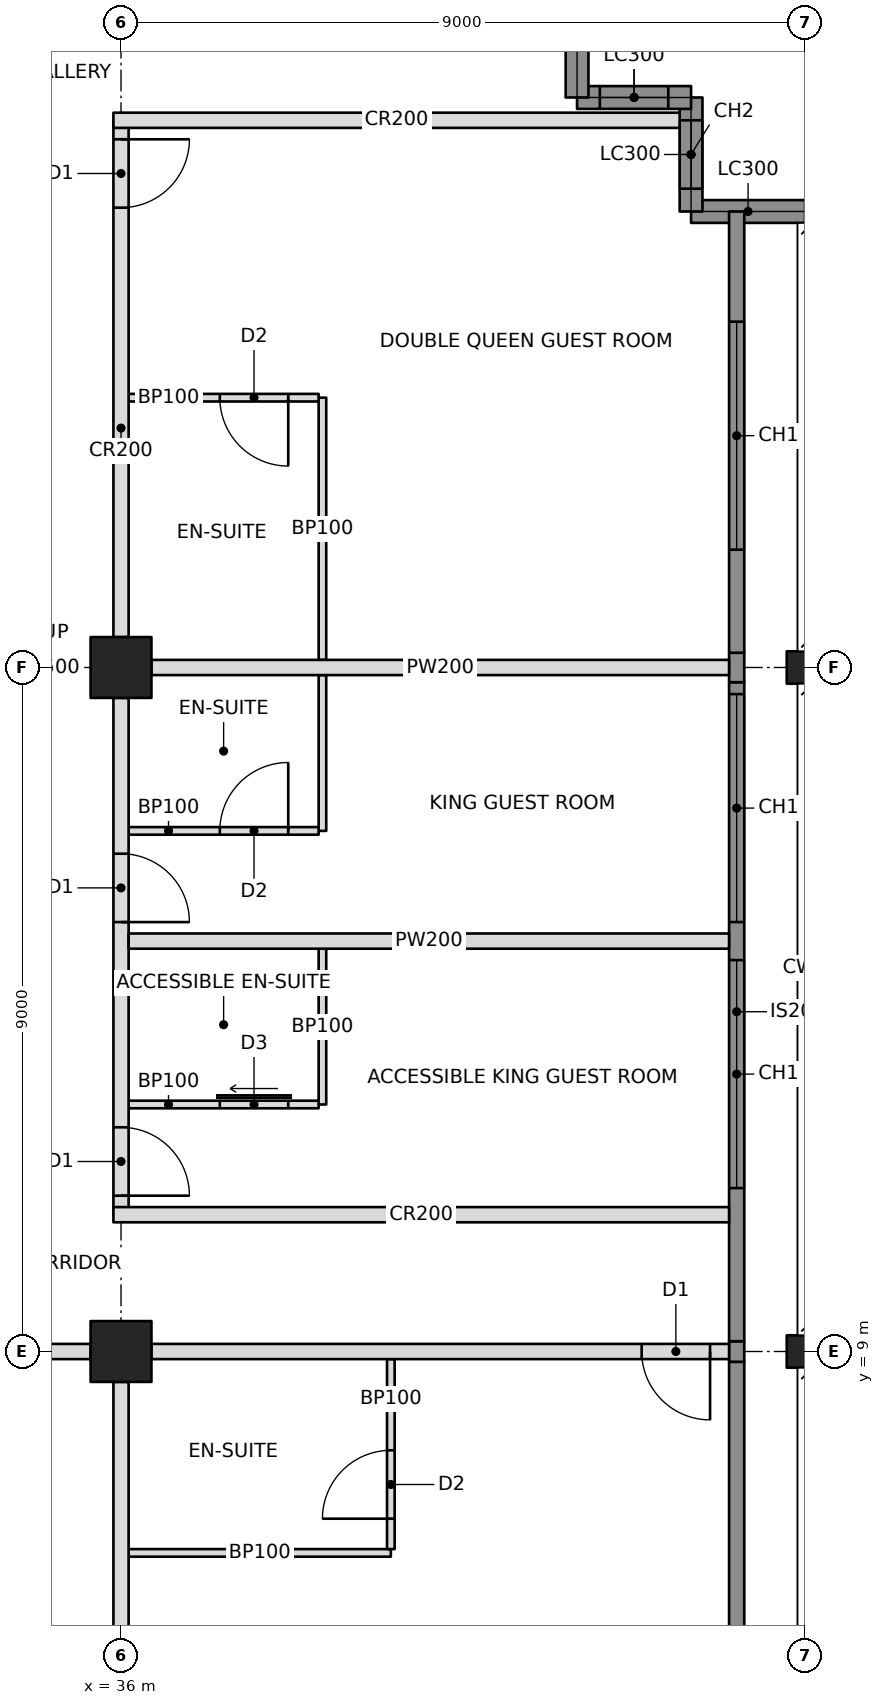
"""IFC4 building model, lengths in metres.
Left out: names, types, materials, properties, quantities, classifications, styles, units other than length and angle.
Written with IfcOpenShell. Run it as: python <this file> out.ifc"""

import sys

from ifc_helpers import new_model, si_unit, direction, frame, frame_2d, origin, origin_2d, place, context, subcontext, project, spatial, rectangle, hollow_rectangle, i_section, extrude, element, fill, save


model = new_model("IFC4")
c1 = context("Model", 3, precision=1e-05, world=origin(), true_north=direction((0.0, 1.0)))
c2 = subcontext(c1, "Body", "Model", "MODEL_VIEW")
j1 = project(units=[si_unit("LENGTHUNIT", "METRE"), si_unit("PLANEANGLEUNIT", "RADIAN")], contexts=[c1])
p1 = place(None, origin())
s1 = spatial("IfcSite", under=j1, at=p1, CompositionType="ELEMENT")
p2 = place(p1, origin())
s2 = spatial("IfcBuilding", under=s1, at=p2, CompositionType="ELEMENT")
p3 = place(p2, frame((0.0, 0.0, 197.8)))
s3 = spatial("IfcBuildingStorey", under=s2, at=p3, CompositionType="ELEMENT", Elevation=197.8)
for number, where, z_axis, x_axis in (
    (1, (36.0, 9.0, 0.0), (0.0, 0.0, 1.0), (0.0, 1.0, 0.0)),
    (2, (36.0, 18.0, 0.0), (0.0, 0.0, 1.0), (0.0, 1.0, 0.0)),
):
    element("IfcColumn", number, at=place(p3, frame(where, z_axis=z_axis, x_axis=x_axis)), inside=s3, PredefinedType="COLUMN", context=c2, shape_type="SweptSolid", body=[
        extrude(hollow_rectangle(XDim=0.8, YDim=0.8, WallThickness=0.05, at=origin_2d()), origin(), (0.0, 0.0, 1.0), 3.4),
    ])
for number, where, z_axis, x_axis in (
    (3, (45.0, 9.0, 0.0), (0.0, 0.0, 1.0), (0.0, 1.0, 0.0)),
    (4, (45.0, 18.0, 0.0), (0.0, 0.0, 1.0), (0.0, 1.0, 0.0)),
):
    element("IfcColumn", number, at=place(p3, frame(where, z_axis=z_axis, x_axis=x_axis)), inside=s3, PredefinedType="COLUMN", context=c2, shape_type="SweptSolid", body=[
        extrude(i_section(OverallWidth=0.427, OverallDepth=0.483, WebThickness=0.051, FlangeThickness=0.082, at=origin_2d()), origin(), (0.0, 0.0, 1.0), 3.4),
    ])
p4 = place(p3, frame((45.0, 24.0, 0.0), z_axis=(0.0, 0.0, 1.0), x_axis=(-1.0, 0.0, 0.0)))
e5 = element("IfcWall", 5, at=p4, inside=s3, PredefinedType="SOLIDWALL", context=c2, shape_type="SweptSolid", body=[
    extrude(rectangle(XDim=1.5, YDim=0.3, at=frame_2d((0.75, 0.0))), origin(), (0.0, 0.0, 1.0), 2.42),
])
p5 = place(p3, frame((43.5, 24.0, 0.0), z_axis=(0.0, 0.0, 1.0), x_axis=(0.0, 1.0, 0.0)))
e6 = element("IfcWall", 6, at=p5, inside=s3, PredefinedType="SOLIDWALL", context=c2, shape_type="SweptSolid", body=[
    extrude(rectangle(XDim=1.5, YDim=0.3, at=frame_2d((0.75, 0.0))), origin(), (0.0, 0.0, 1.0), 3.2),
])
p6 = place(p5, frame((0.3, 0.0, 0.6)))
e7 = element("IfcOpeningElement", 7, at=p6, cuts=e6, PredefinedType="OPENING", context=c2, shape_type="SweptSolid", body=[
    extrude(rectangle(XDim=0.9, YDim=2.2, at=frame_2d((0.45, 1.1))), frame((0.0, 0.16, 0.0), z_axis=(0.0, -1.0, 0.0), x_axis=(1.0, 0.0, 0.0)), (0.0, 0.0, 1.0), 0.32),
])
p7 = place(p3, frame((43.5, 25.5, 0.0), z_axis=(0.0, 0.0, 1.0), x_axis=(-1.0, 0.0, 0.0)))
e8 = element("IfcWall", 8, at=p7, inside=s3, PredefinedType="SOLIDWALL", context=c2, shape_type="SweptSolid", body=[
    extrude(rectangle(XDim=1.5, YDim=0.3, at=frame_2d((0.75, 0.0))), origin(), (0.0, 0.0, 1.0), 3.2),
])
p8 = place(p7, frame((0.3, 0.0, 0.6)))
e9 = element("IfcOpeningElement", 9, at=p8, cuts=e8, PredefinedType="OPENING", context=c2, shape_type="SweptSolid", body=[
    extrude(rectangle(XDim=0.9, YDim=2.2, at=frame_2d((0.45, 1.1))), frame((0.0, 0.16, 0.0), z_axis=(0.0, -1.0, 0.0), x_axis=(1.0, 0.0, 0.0)), (0.0, 0.0, 1.0), 0.32),
])
p9 = place(p3, frame((42.0, 25.5, 0.0), z_axis=(0.0, 0.0, 1.0), x_axis=(0.0, 1.0, 0.0)))
e10 = element("IfcWall", 10, at=p9, inside=s3, PredefinedType="SOLIDWALL", context=c2, shape_type="SweptSolid", body=[
    extrude(rectangle(XDim=1.5, YDim=0.3, at=frame_2d((0.75, 0.0))), origin(), (0.0, 0.0, 1.0), 2.42),
])
p10 = place(p3, frame((27.4, 9.0, 0.0), z_axis=(0.0, 0.0, 1.0), x_axis=(1.0, 0.0, 0.0)))
e11 = element("IfcWall", 11, at=p10, inside=s3, PredefinedType="PARTITIONING", context=c2, shape_type="SweptSolid", body=[
    extrude(rectangle(XDim=8.2, YDim=0.2, at=frame_2d((4.1, 0.0))), origin(), (0.0, 0.0, 1.0), 2.405),
])
p11 = place(p10, frame((0.15, 0.0, 0.0)))
e12 = element("IfcOpeningElement", 12, at=p11, cuts=e11, PredefinedType="OPENING", context=c2, shape_type="SweptSolid", body=[
    extrude(rectangle(XDim=0.9, YDim=2.1, at=frame_2d((0.45, 1.05))), frame((0.0, 0.11, 0.0), z_axis=(0.0, -1.0, 0.0), x_axis=(1.0, 0.0, 0.0)), (0.0, 0.0, 1.0), 0.22),
])
p12 = place(p3, frame((36.4, 9.0, 0.0), z_axis=(0.0, 0.0, 1.0), x_axis=(1.0, 0.0, 0.0)))
e13 = element("IfcWall", 13, at=p12, inside=s3, PredefinedType="PARTITIONING", context=c2, shape_type="SweptSolid", body=[
    extrude(rectangle(XDim=7.6, YDim=0.2, at=frame_2d((3.8, 0.0))), origin(), (0.0, 0.0, 1.0), 2.438),
])
p13 = place(p12, frame((6.45, 0.0, 0.0)))
e14 = element("IfcOpeningElement", 14, at=p13, cuts=e13, PredefinedType="OPENING", context=c2, shape_type="SweptSolid", body=[
    extrude(rectangle(XDim=0.9, YDim=2.1, at=frame_2d((0.45, 1.05))), frame((0.0, 0.11, 0.0), z_axis=(0.0, -1.0, 0.0), x_axis=(1.0, 0.0, 0.0)), (0.0, 0.0, 1.0), 0.22),
])
p14 = place(p3, frame((36.0, 10.8, 0.0), z_axis=(0.0, 0.0, 1.0), x_axis=(0.0, 1.0, 0.0)))
e15 = element("IfcWall", 15, at=p14, inside=s3, PredefinedType="PARTITIONING", context=c2, shape_type="SweptSolid", body=[
    extrude(rectangle(XDim=6.8, YDim=0.2, at=frame_2d((3.4, 0.0))), origin(), (0.0, 0.0, 1.0), 2.405),
])
p15 = place(p14, frame((0.25, 0.0, 0.0)))
e16 = element("IfcOpeningElement", 16, at=p15, cuts=e15, PredefinedType="OPENING", context=c2, shape_type="SweptSolid", body=[
    extrude(rectangle(XDim=0.9, YDim=2.1, at=frame_2d((0.45, 1.05))), frame((0.0, 0.11, 0.0), z_axis=(0.0, -1.0, 0.0), x_axis=(1.0, 0.0, 0.0)), (0.0, 0.0, 1.0), 0.22),
])
p16 = place(p14, frame((3.85, 0.0, 0.0)))
e17 = element("IfcOpeningElement", 17, at=p16, cuts=e15, PredefinedType="OPENING", context=c2, shape_type="SweptSolid", body=[
    extrude(rectangle(XDim=0.9, YDim=2.1, at=frame_2d((0.45, 1.05))), frame((0.0, 0.11, 0.0), z_axis=(0.0, -1.0, 0.0), x_axis=(1.0, 0.0, 0.0)), (0.0, 0.0, 1.0), 0.22),
])
p17 = place(p3, frame((36.0, 18.4, 0.0), z_axis=(0.0, 0.0, 1.0), x_axis=(0.0, 1.0, 0.0)))
e18 = element("IfcWall", 18, at=p17, inside=s3, PredefinedType="PARTITIONING", context=c2, shape_type="SweptSolid", body=[
    extrude(rectangle(XDim=6.8, YDim=0.2, at=frame_2d((3.4, 0.0))), origin(), (0.0, 0.0, 1.0), 2.405),
])
p18 = place(p17, frame((5.65, 0.0, 0.0)))
e19 = element("IfcOpeningElement", 19, at=p18, cuts=e18, PredefinedType="OPENING", context=c2, shape_type="SweptSolid", body=[
    extrude(rectangle(XDim=0.9, YDim=2.1, at=frame_2d((0.45, 1.05))), frame((0.0, 0.11, 0.0), z_axis=(0.0, -1.0, 0.0), x_axis=(1.0, 0.0, 0.0)), (0.0, 0.0, 1.0), 0.22),
])
p19 = place(p3, frame((35.9, 10.8, 0.0), z_axis=(0.0, 0.0, 1.0), x_axis=(1.0, 0.0, 0.0)))
e20 = element("IfcWall", 20, at=p19, inside=s3, PredefinedType="PARTITIONING", context=c2, shape_type="SweptSolid", body=[
    extrude(rectangle(XDim=8.1, YDim=0.2, at=frame_2d((4.05, 0.0))), origin(), (0.0, 0.0, 1.0), 2.404),
])
p20 = place(p3, frame((35.9, 25.2, 0.0), z_axis=(0.0, 0.0, 1.0), x_axis=(1.0, 0.0, 0.0)))
e21 = element("IfcWall", 21, at=p20, inside=s3, PredefinedType="PARTITIONING", context=c2, shape_type="SweptSolid", body=[
    extrude(rectangle(XDim=7.45, YDim=0.2, at=frame_2d((3.725, 0.0))), origin(), (0.0, 0.0, 1.0), 2.404),
])
p21 = place(p3, frame((36.0, 8.6, 0.0), z_axis=(0.0, 0.0, 1.0), x_axis=(0.0, -1.0, 0.0)))
e22 = element("IfcWall", 22, at=p21, inside=s3, PredefinedType="PARTITIONING", context=c2, shape_type="SweptSolid", body=[
    extrude(rectangle(XDim=7.6, YDim=0.2, at=frame_2d((3.8, 0.0))), origin(), (0.0, 0.0, 1.0), 2.438),
])
p22 = place(p3, frame((36.1, 6.35, 0.0), z_axis=(0.0, 0.0, 1.0), x_axis=(1.0, 0.0, 0.0)))
e23 = element("IfcWall", 23, at=p22, inside=s3, PredefinedType="PARTITIONING", context=c2, shape_type="SweptSolid", body=[
    extrude(rectangle(XDim=3.45, YDim=0.1, at=frame_2d((1.725, 0.0))), origin(), (0.0, 0.0, 1.0), 2.438),
])
p23 = place(p3, frame((39.55, 8.9, 0.0), z_axis=(0.0, 0.0, 1.0), x_axis=(0.0, -1.0, 0.0)))
e24 = element("IfcWall", 24, at=p23, inside=s3, PredefinedType="PARTITIONING", context=c2, shape_type="SweptSolid", body=[
    extrude(rectangle(XDim=2.5, YDim=0.1, at=frame_2d((1.25, 0.0))), origin(), (0.0, 0.0, 1.0), 2.438),
])
p24 = place(p23, frame((1.2, 0.0, 0.0)))
e25 = element("IfcOpeningElement", 25, at=p24, cuts=e24, PredefinedType="OPENING", context=c2, shape_type="SweptSolid", body=[
    extrude(rectangle(XDim=0.9, YDim=2.1, at=frame_2d((0.45, 1.05))), frame((0.0, 0.06, 0.0), z_axis=(0.0, -1.0, 0.0), x_axis=(1.0, 0.0, 0.0)), (0.0, 0.0, 1.0), 0.12),
])
p25 = place(p3, frame((36.1, 14.4, 0.0), z_axis=(0.0, 0.0, 1.0), x_axis=(1.0, 0.0, 0.0)))
e26 = element("IfcWall", 26, at=p25, inside=s3, PredefinedType="PARTITIONING", context=c2, shape_type="SweptSolid", body=[
    extrude(rectangle(XDim=7.9, YDim=0.2, at=frame_2d((3.95, 0.0))), origin(), (0.0, 0.0, 1.0), 2.404),
])
p26 = place(p3, frame((36.4, 18.0, 0.0), z_axis=(0.0, 0.0, 1.0), x_axis=(1.0, 0.0, 0.0)))
e27 = element("IfcWall", 27, at=p26, inside=s3, PredefinedType="PARTITIONING", context=c2, shape_type="SweptSolid", body=[
    extrude(rectangle(XDim=7.6, YDim=0.2, at=frame_2d((3.8, 0.0))), origin(), (0.0, 0.0, 1.0), 2.405),
])
p27 = place(p3, frame((38.65, 12.25, 0.0), z_axis=(0.0, 0.0, 1.0), x_axis=(0.0, 1.0, 0.0)))
e28 = element("IfcWall", 28, at=p27, inside=s3, PredefinedType="PARTITIONING", context=c2, shape_type="SweptSolid", body=[
    extrude(rectangle(XDim=2.05, YDim=0.1, at=frame_2d((1.025, 0.0))), origin(), (0.0, 0.0, 1.0), 3.2),
])
p28 = place(p3, frame((36.1, 12.25, 0.0), z_axis=(0.0, 0.0, 1.0), x_axis=(1.0, 0.0, 0.0)))
e29 = element("IfcWall", 29, at=p28, inside=s3, PredefinedType="PARTITIONING", context=c2, shape_type="SweptSolid", body=[
    extrude(rectangle(XDim=2.5, YDim=0.1, at=frame_2d((1.25, 0.0))), origin(), (0.0, 0.0, 1.0), 2.404),
])
p29 = place(p28, frame((1.2, 0.0, 0.0)))
e30 = element("IfcOpeningElement", 30, at=p29, cuts=e29, PredefinedType="OPENING", context=c2, shape_type="SweptSolid", body=[
    extrude(rectangle(XDim=0.9, YDim=2.1, at=frame_2d((0.45, 1.05))), frame((0.0, 0.06, 0.0), z_axis=(0.0, -1.0, 0.0), x_axis=(1.0, 0.0, 0.0)), (0.0, 0.0, 1.0), 0.12),
])
p30 = place(p3, frame((38.65, 15.85, 0.0), z_axis=(0.0, 0.0, 1.0), x_axis=(0.0, 1.0, 0.0)))
e31 = element("IfcWall", 31, at=p30, inside=s3, PredefinedType="PARTITIONING", context=c2, shape_type="SweptSolid", body=[
    extrude(rectangle(XDim=2.05, YDim=0.1, at=frame_2d((1.025, 0.0))), origin(), (0.0, 0.0, 1.0), 2.404),
])
p31 = place(p3, frame((36.1, 15.85, 0.0), z_axis=(0.0, 0.0, 1.0), x_axis=(1.0, 0.0, 0.0)))
e32 = element("IfcWall", 32, at=p31, inside=s3, PredefinedType="PARTITIONING", context=c2, shape_type="SweptSolid", body=[
    extrude(rectangle(XDim=2.5, YDim=0.1, at=frame_2d((1.25, 0.0))), origin(), (0.0, 0.0, 1.0), 2.404),
])
p32 = place(p31, frame((1.2, 0.0, 0.0)))
e33 = element("IfcOpeningElement", 33, at=p32, cuts=e32, PredefinedType="OPENING", context=c2, shape_type="SweptSolid", body=[
    extrude(rectangle(XDim=0.9, YDim=2.1, at=frame_2d((0.45, 1.05))), frame((0.0, 0.06, 0.0), z_axis=(0.0, -1.0, 0.0), x_axis=(1.0, 0.0, 0.0)), (0.0, 0.0, 1.0), 0.12),
])
p33 = place(p3, frame((38.65, 18.1, 0.0), z_axis=(0.0, 0.0, 1.0), x_axis=(0.0, 1.0, 0.0)))
e34 = element("IfcWall", 34, at=p33, inside=s3, PredefinedType="PARTITIONING", context=c2, shape_type="SweptSolid", body=[
    extrude(rectangle(XDim=3.45, YDim=0.1, at=frame_2d((1.725, 0.0))), origin(), (0.0, 0.0, 1.0), 2.404),
])
p34 = place(p3, frame((36.1, 21.55, 0.0), z_axis=(0.0, 0.0, 1.0), x_axis=(1.0, 0.0, 0.0)))
e35 = element("IfcWall", 35, at=p34, inside=s3, PredefinedType="PARTITIONING", context=c2, shape_type="SweptSolid", body=[
    extrude(rectangle(XDim=2.5, YDim=0.1, at=frame_2d((1.25, 0.0))), origin(), (0.0, 0.0, 1.0), 2.404),
])
p35 = place(p34, frame((1.2, 0.0, 0.0)))
e36 = element("IfcOpeningElement", 36, at=p35, cuts=e35, PredefinedType="OPENING", context=c2, shape_type="SweptSolid", body=[
    extrude(rectangle(XDim=0.9, YDim=2.1, at=frame_2d((0.45, 1.05))), frame((0.0, 0.06, 0.0), z_axis=(0.0, -1.0, 0.0), x_axis=(1.0, 0.0, 0.0)), (0.0, 0.0, 1.0), 0.12),
])
p36 = place(p3, frame((44.1, 4.607, 0.0), z_axis=(0.0, 0.0, 1.0), x_axis=(0.0, 1.0, 0.0)))
e37 = element("IfcWall", 37, at=p36, inside=s3, PredefinedType="SOLIDWALL", context=c2, shape_type="SweptSolid", body=[
    extrude(rectangle(XDim=4.257, YDim=0.2, at=frame_2d((2.129, 0.0))), origin(), (0.0, 0.0, 1.0), 3.2),
])
p37 = place(p3, frame((44.1, 8.865, 0.0), z_axis=(0.0, 0.0, 1.0), x_axis=(0.0, 1.0, 0.0)))
e38 = element("IfcWall", 38, at=p37, inside=s3, PredefinedType="SOLIDWALL", context=c2, shape_type="SweptSolid", body=[
    extrude(rectangle(XDim=0.271, YDim=0.2, at=frame_2d((0.135, 0.0))), origin(), (0.0, 0.0, 1.0), 2.438),
])
p38 = place(p3, frame((44.1, 9.135, 0.0), z_axis=(0.0, 0.0, 1.0), x_axis=(0.0, 1.0, 0.0)))
e39 = element("IfcWall", 39, at=p38, inside=s3, PredefinedType="SOLIDWALL", context=c2, shape_type="SweptSolid", body=[
    extrude(rectangle(XDim=8.671, YDim=0.2, at=frame_2d((4.335, 0.0))), origin(), (0.0, 0.0, 1.0), 3.2),
])
p39 = place(p38, frame((2.015, 0.0, 0.6)))
e40 = element("IfcOpeningElement", 40, at=p39, cuts=e39, PredefinedType="OPENING", context=c2, shape_type="SweptSolid", body=[
    extrude(rectangle(XDim=3.0, YDim=2.2, at=frame_2d((1.5, 1.1))), frame((0.0, 0.11, 0.0), z_axis=(0.0, -1.0, 0.0), x_axis=(1.0, 0.0, 0.0)), (0.0, 0.0, 1.0), 0.22),
])
p40 = place(p38, frame((5.515, 0.0, 0.6)))
e41 = element("IfcOpeningElement", 41, at=p40, cuts=e39, PredefinedType="OPENING", context=c2, shape_type="SweptSolid", body=[
    extrude(rectangle(XDim=3.0, YDim=2.2, at=frame_2d((1.5, 1.1))), frame((0.0, 0.11, 0.0), z_axis=(0.0, -1.0, 0.0), x_axis=(1.0, 0.0, 0.0)), (0.0, 0.0, 1.0), 0.22),
])
p41 = place(p3, frame((44.1, 17.806, 0.0), z_axis=(0.0, 0.0, 1.0), x_axis=(0.0, 1.0, 0.0)))
e42 = element("IfcWall", 42, at=p41, inside=s3, PredefinedType="SOLIDWALL", context=c2, shape_type="SweptSolid", body=[
    extrude(rectangle(XDim=0.388, YDim=0.2, at=frame_2d((0.194, 0.0))), origin(), (0.0, 0.0, 1.0), 2.404),
])
p42 = place(p3, frame((44.1, 18.194, 0.0), z_axis=(0.0, 0.0, 1.0), x_axis=(0.0, 1.0, 0.0)))
e43 = element("IfcWall", 43, at=p42, inside=s3, PredefinedType="SOLIDWALL", context=c2, shape_type="SweptSolid", body=[
    extrude(rectangle(XDim=5.806, YDim=0.2, at=frame_2d((2.903, 0.0))), origin(), (0.0, 0.0, 1.0), 3.2),
])
p43 = place(p42, frame((1.356, 0.0, 0.6)))
e44 = element("IfcOpeningElement", 44, at=p43, cuts=e43, PredefinedType="OPENING", context=c2, shape_type="SweptSolid", body=[
    extrude(rectangle(XDim=3.0, YDim=2.2, at=frame_2d((1.5, 1.1))), frame((0.0, 0.11, 0.0), z_axis=(0.0, -1.0, 0.0), x_axis=(1.0, 0.0, 0.0)), (0.0, 0.0, 1.0), 0.22),
])
p44 = place(p6, origin())
e45 = element("IfcWindow", 45, at=p44, inside=s3, PartitioningType="SINGLE_PANEL", PredefinedType="WINDOW", context=c2, shape_type="SweptSolid", body=[
    extrude(rectangle(XDim=0.9, YDim=2.2, at=frame_2d((0.45, 1.1))), frame((0.0, 0.03, 0.0), z_axis=(0.0, -1.0, 0.0), x_axis=(1.0, 0.0, 0.0)), (0.0, 0.0, 1.0), 0.06),
])
fill(e7, e45)
p45 = place(p8, origin())
e46 = element("IfcWindow", 46, at=p45, inside=s3, PartitioningType="SINGLE_PANEL", PredefinedType="WINDOW", context=c2, shape_type="SweptSolid", body=[
    extrude(rectangle(XDim=0.9, YDim=2.2, at=frame_2d((0.45, 1.1))), frame((0.0, 0.03, 0.0), z_axis=(0.0, -1.0, 0.0), x_axis=(1.0, 0.0, 0.0)), (0.0, 0.0, 1.0), 0.06),
])
fill(e9, e46)
p46 = place(p39, origin())
e47 = element("IfcWindow", 47, at=p46, inside=s3, PartitioningType="TRIPLE_PANEL_VERTICAL", PredefinedType="WINDOW", context=c2, shape_type="SweptSolid", body=[
    extrude(rectangle(XDim=3.0, YDim=2.2, at=frame_2d((1.5, 1.1))), frame((0.0, 0.03, 0.0), z_axis=(0.0, -1.0, 0.0), x_axis=(1.0, 0.0, 0.0)), (0.0, 0.0, 1.0), 0.06),
])
fill(e40, e47)
p47 = place(p40, origin())
e48 = element("IfcWindow", 48, at=p47, inside=s3, PartitioningType="TRIPLE_PANEL_VERTICAL", PredefinedType="WINDOW", context=c2, shape_type="SweptSolid", body=[
    extrude(rectangle(XDim=3.0, YDim=2.2, at=frame_2d((1.5, 1.1))), frame((0.0, 0.03, 0.0), z_axis=(0.0, -1.0, 0.0), x_axis=(1.0, 0.0, 0.0)), (0.0, 0.0, 1.0), 0.06),
])
fill(e41, e48)
p48 = place(p43, origin())
e49 = element("IfcWindow", 49, at=p48, inside=s3, PartitioningType="TRIPLE_PANEL_VERTICAL", PredefinedType="WINDOW", context=c2, shape_type="SweptSolid", body=[
    extrude(rectangle(XDim=3.0, YDim=2.2, at=frame_2d((1.5, 1.1))), frame((0.0, 0.03, 0.0), z_axis=(0.0, -1.0, 0.0), x_axis=(1.0, 0.0, 0.0)), (0.0, 0.0, 1.0), 0.06),
])
fill(e44, e49)
p49 = place(p24, frame((0.9, 0.0, 0.0), z_axis=(0.0, 0.0, 1.0), x_axis=(-1.0, 0.0, 0.0)))
e50 = element("IfcDoor", 50, at=p49, inside=s3, OperationType="SINGLE_SWING_LEFT", PredefinedType="DOOR", context=c2, shape_type="SweptSolid", body=[
    extrude(rectangle(XDim=0.9, YDim=2.1, at=frame_2d((0.45, 1.05))), frame((0.0, 0.025, 0.0), z_axis=(0.0, -1.0, 0.0), x_axis=(1.0, 0.0, 0.0)), (0.0, 0.0, 1.0), 0.05),
])
fill(e25, e50)
p50 = place(p13, frame((0.9, 0.0, 0.0), z_axis=(0.0, 0.0, 1.0), x_axis=(-1.0, 0.0, 0.0)))
e51 = element("IfcDoor", 51, at=p50, inside=s3, OperationType="SINGLE_SWING_LEFT", PredefinedType="DOOR", context=c2, shape_type="SweptSolid", body=[
    extrude(rectangle(XDim=0.9, YDim=2.1, at=frame_2d((0.45, 1.05))), frame((0.0, 0.025, 0.0), z_axis=(0.0, -1.0, 0.0), x_axis=(1.0, 0.0, 0.0)), (0.0, 0.0, 1.0), 0.05),
])
fill(e14, e51)
p51 = place(p29, origin())
e52 = element("IfcDoor", 52, at=p51, inside=s3, OperationType="SLIDING_TO_LEFT", PredefinedType="DOOR", context=c2, shape_type="SweptSolid", body=[
    extrude(rectangle(XDim=0.9, YDim=2.1, at=frame_2d((0.45, 1.05))), frame((0.0, 0.025, 0.0), z_axis=(0.0, -1.0, 0.0), x_axis=(1.0, 0.0, 0.0)), (0.0, 0.0, 1.0), 0.05),
])
fill(e30, e52)
p52 = place(p15, frame((0.9, 0.0, 0.0), z_axis=(0.0, 0.0, 1.0), x_axis=(-1.0, 0.0, 0.0)))
e53 = element("IfcDoor", 53, at=p52, inside=s3, OperationType="SINGLE_SWING_RIGHT", PredefinedType="DOOR", context=c2, shape_type="SweptSolid", body=[
    extrude(rectangle(XDim=0.9, YDim=2.1, at=frame_2d((0.45, 1.05))), frame((0.0, 0.025, 0.0), z_axis=(0.0, -1.0, 0.0), x_axis=(1.0, 0.0, 0.0)), (0.0, 0.0, 1.0), 0.05),
])
fill(e16, e53)
p53 = place(p32, origin())
e54 = element("IfcDoor", 54, at=p53, inside=s3, OperationType="SINGLE_SWING_RIGHT", PredefinedType="DOOR", context=c2, shape_type="SweptSolid", body=[
    extrude(rectangle(XDim=0.9, YDim=2.1, at=frame_2d((0.45, 1.05))), frame((0.0, 0.025, 0.0), z_axis=(0.0, -1.0, 0.0), x_axis=(1.0, 0.0, 0.0)), (0.0, 0.0, 1.0), 0.05),
])
fill(e33, e54)
p54 = place(p16, frame((0.9, 0.0, 0.0), z_axis=(0.0, 0.0, 1.0), x_axis=(-1.0, 0.0, 0.0)))
e55 = element("IfcDoor", 55, at=p54, inside=s3, OperationType="SINGLE_SWING_RIGHT", PredefinedType="DOOR", context=c2, shape_type="SweptSolid", body=[
    extrude(rectangle(XDim=0.9, YDim=2.1, at=frame_2d((0.45, 1.05))), frame((0.0, 0.025, 0.0), z_axis=(0.0, -1.0, 0.0), x_axis=(1.0, 0.0, 0.0)), (0.0, 0.0, 1.0), 0.05),
])
fill(e17, e55)
p55 = place(p35, frame((0.9, 0.0, 0.0), z_axis=(0.0, 0.0, 1.0), x_axis=(-1.0, 0.0, 0.0)))
e56 = element("IfcDoor", 56, at=p55, inside=s3, OperationType="SINGLE_SWING_LEFT", PredefinedType="DOOR", context=c2, shape_type="SweptSolid", body=[
    extrude(rectangle(XDim=0.9, YDim=2.1, at=frame_2d((0.45, 1.05))), frame((0.0, 0.025, 0.0), z_axis=(0.0, -1.0, 0.0), x_axis=(1.0, 0.0, 0.0)), (0.0, 0.0, 1.0), 0.05),
])
fill(e36, e56)
p56 = place(p18, frame((0.9, 0.0, 0.0), z_axis=(0.0, 0.0, 1.0), x_axis=(-1.0, 0.0, 0.0)))
e57 = element("IfcDoor", 57, at=p56, inside=s3, OperationType="SINGLE_SWING_LEFT", PredefinedType="DOOR", context=c2, shape_type="SweptSolid", body=[
    extrude(rectangle(XDim=0.9, YDim=2.1, at=frame_2d((0.45, 1.05))), frame((0.0, 0.025, 0.0), z_axis=(0.0, -1.0, 0.0), x_axis=(1.0, 0.0, 0.0)), (0.0, 0.0, 1.0), 0.05),
])
fill(e19, e57)
save(model, sys.argv[1])
